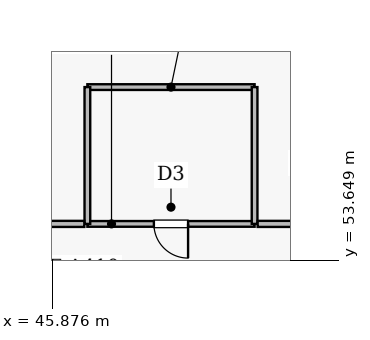
"""IFC4 building model, lengths in metres.
Left out: names, types, materials, properties, quantities, classifications, styles, units other than length and angle.
Written with IfcOpenShell. Run it as: python <this file> out.ifc"""

import sys

from ifc_helpers import new_model, si_unit, direction, frame, frame_2d, origin, place, context, subcontext, project, spatial, rectangle, extrude, element, fill, save


model = new_model("IFC4")
c1 = context("Model", 3, precision=1e-05, world=origin(), true_north=direction((0.0, 1.0)))
c2 = subcontext(c1, "Body", "Model", "MODEL_VIEW")
j1 = project(units=[si_unit("LENGTHUNIT", "METRE"), si_unit("PLANEANGLEUNIT", "RADIAN")], contexts=[c1])
p1 = place(None, origin())
s1 = spatial("IfcSite", under=j1, at=p1, CompositionType="ELEMENT")
p2 = place(p1, origin())
s2 = spatial("IfcBuilding", under=s1, at=p2, CompositionType="ELEMENT")
p3 = place(p2, frame((0.0, 0.0, 189.8)))
s3 = spatial("IfcBuildingStorey", under=s2, at=p3, CompositionType="ELEMENT", Elevation=189.8)
p4 = place(p3, frame((53.621, 58.447, 0.0), z_axis=(0.0, 0.0, 1.0), x_axis=(-0.623573825008, 0.781764468856, 0.0)))
e1 = element("IfcWall", 1, at=p4, inside=s3, PredefinedType="SOLIDWALL", context=c2, shape_type="SweptSolid", body=[
    extrude(rectangle(XDim=4.065, YDim=0.27, at=frame_2d((2.033, 0.0))), origin(), (0.0, 0.0, 1.0), 4.345),
])
p5 = place(p4, frame((0.982, 0.0, 0.8)))
e2 = element("IfcOpeningElement", 2, at=p5, cuts=e1, PredefinedType="OPENING", context=c2, shape_type="SweptSolid", body=[
    extrude(rectangle(XDim=2.1, YDim=1.7, at=frame_2d((1.05, 0.85))), frame((0.0, 0.145, 0.0), z_axis=(0.0, -1.0, 0.0), x_axis=(1.0, 0.0, 0.0)), (0.0, 0.0, 1.0), 0.29),
])
p6 = place(p3, frame((51.2, 54.6, 0.0), z_axis=(0.0, 0.0, 1.0), x_axis=(-1.0, 0.0, 0.0)))
e3 = element("IfcWall", 3, at=p6, inside=s3, PredefinedType="PLUMBINGWALL", context=c2, shape_type="SweptSolid", body=[
    extrude(rectangle(XDim=4.4, YDim=0.15, at=frame_2d((2.2, 0.0))), origin(), (0.0, 0.0, 1.0), 3.533),
])
p7 = place(p6, frame((1.75, 0.0, 0.0)))
e4 = element("IfcOpeningElement", 4, at=p7, cuts=e3, PredefinedType="OPENING", context=c2, shape_type="SweptSolid", body=[
    extrude(rectangle(XDim=0.9, YDim=2.1, at=frame_2d((0.45, 1.05))), frame((0.0, 0.085, 0.0), z_axis=(0.0, -1.0, 0.0), x_axis=(1.0, 0.0, 0.0)), (0.0, 0.0, 1.0), 0.17),
])
p8 = place(p3, frame((51.2, 58.2, 0.0), z_axis=(0.0, 0.0, 1.0), x_axis=(-1.0, 0.0, 0.0)))
e5 = element("IfcWall", 5, at=p8, inside=s3, PredefinedType="PLUMBINGWALL", context=c2, shape_type="SweptSolid", body=[
    extrude(rectangle(XDim=4.4, YDim=0.15, at=frame_2d((2.2, 0.0))), origin(), (0.0, 0.0, 1.0), 4.345),
])
p9 = place(p3, frame((51.2, 54.6, 0.0), z_axis=(0.0, 0.0, 1.0), x_axis=(0.0, 1.0, 0.0)))
e6 = element("IfcWall", 6, at=p9, inside=s3, PredefinedType="PLUMBINGWALL", context=c2, shape_type="SweptSolid", body=[
    extrude(rectangle(XDim=3.6, YDim=0.15, at=frame_2d((1.8, 0.0))), origin(), (0.0, 0.0, 1.0), 4.345),
])
p10 = place(p3, frame((46.8, 58.2, 0.0), z_axis=(0.0, 0.0, 1.0), x_axis=(0.0, -1.0, 0.0)))
e7 = element("IfcWall", 7, at=p10, inside=s3, PredefinedType="PLUMBINGWALL", context=c2, shape_type="SweptSolid", body=[
    extrude(rectangle(XDim=3.6, YDim=0.15, at=frame_2d((1.8, 0.0))), origin(), (0.0, 0.0, 1.0), 3.533),
])
p11 = place(p3, frame((54.52, 54.6, 0.0), z_axis=(0.0, 0.0, 1.0), x_axis=(-1.0, 0.0, 0.0)))
e8 = element("IfcWall", 8, at=p11, inside=s3, PredefinedType="SOLIDWALL", context=c2, shape_type="SweptSolid", body=[
    extrude(rectangle(XDim=3.24, YDim=0.16, at=frame_2d((1.62, 0.0))), origin(), (0.0, 0.0, 1.0), 4.345),
])
p12 = place(p3, frame((46.72, 54.6, 0.0), z_axis=(0.0, 0.0, 1.0), x_axis=(-1.0, 0.0, 0.0)))
e9 = element("IfcWall", 9, at=p12, inside=s3, PredefinedType="SOLIDWALL", context=c2, shape_type="SweptSolid", body=[
    extrude(rectangle(XDim=2.64, YDim=0.16, at=frame_2d((1.32, 0.0))), origin(), (0.0, 0.0, 1.0), 3.533),
])
p13 = place(p7, origin())
e10 = element("IfcDoor", 10, at=p13, inside=s3, OperationType="SINGLE_SWING_LEFT", PredefinedType="DOOR", context=c2, shape_type="SweptSolid", body=[
    extrude(rectangle(XDim=0.9, YDim=2.1, at=frame_2d((0.45, 1.05))), frame((0.0, 0.025, 0.0), z_axis=(0.0, -1.0, 0.0), x_axis=(1.0, 0.0, 0.0)), (0.0, 0.0, 1.0), 0.05),
])
fill(e4, e10)
save(model, sys.argv[1])
